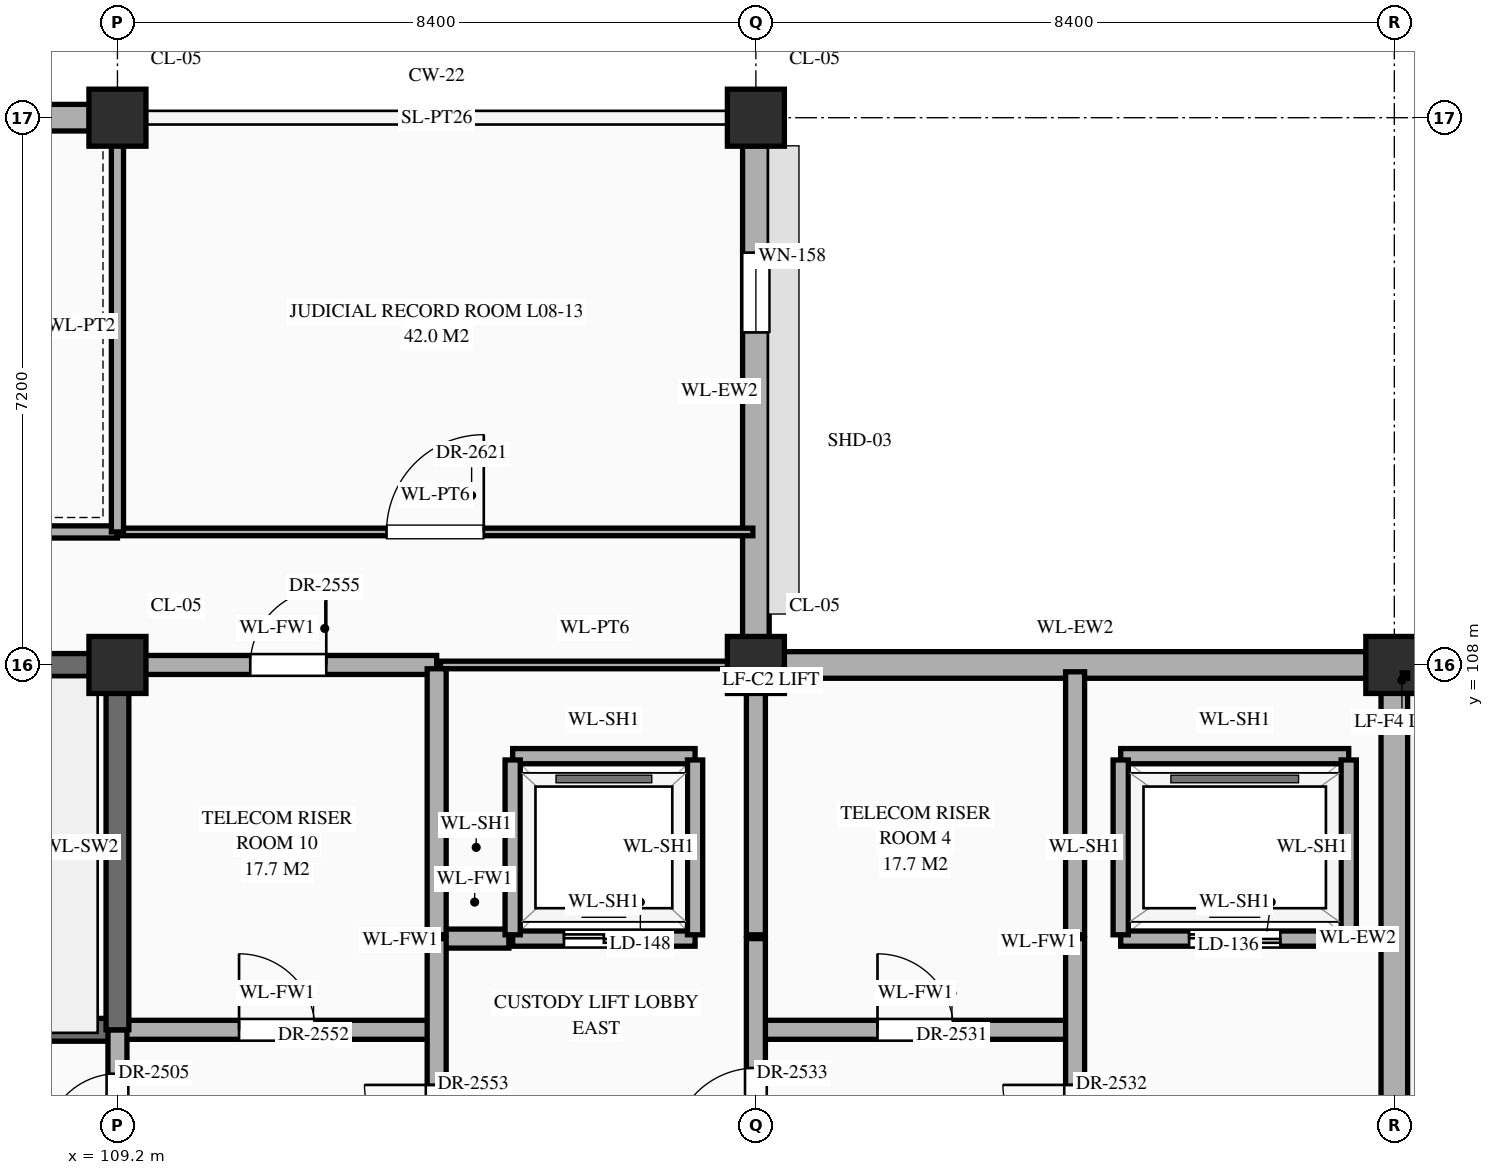
"""IFC4 building model, lengths in metres.
Left out: names, types, materials, properties, quantities, classifications, styles, units other than length and angle.
Written with IfcOpenShell. Run it as: python <this file> out.ifc"""

import sys

from ifc_helpers import new_model, si_unit, direction, frame, frame_2d, origin, origin_2d, place, context, subcontext, project, spatial, rectangle, extrude, element, fill, save


model = new_model("IFC4")
c1 = context("Model", 3, precision=1e-05, world=origin(), true_north=direction((0.0, 1.0)))
c2 = subcontext(c1, "Body", "Model", "MODEL_VIEW")
j1 = project(units=[si_unit("LENGTHUNIT", "METRE"), si_unit("PLANEANGLEUNIT", "RADIAN")], contexts=[c1])
p1 = place(None, origin())
s1 = spatial("IfcSite", under=j1, at=p1, CompositionType="ELEMENT")
p2 = place(p1, origin())
s2 = spatial("IfcBuilding", under=s1, at=p2, CompositionType="ELEMENT")
p3 = place(p2, frame((0.0, 0.0, 35.1)))
s3 = spatial("IfcBuildingStorey", under=s2, at=p3, CompositionType="ELEMENT", Elevation=35.1)
for number, where, z_axis, x_axis in (
    (1, (109.2, 108.0, 0.0), (0.0, 0.0, 1.0), (1.0, 0.0, 0.0)),
    (2, (109.2, 115.2, 0.0), (0.0, 0.0, 1.0), (1.0, 0.0, 0.0)),
    (3, (117.6, 108.0, 0.0), (0.0, 0.0, 1.0), (1.0, 0.0, 0.0)),
    (4, (117.6, 115.2, 0.0), (0.0, 0.0, 1.0), (1.0, 0.0, 0.0)),
    (5, (126.0, 108.0, 0.0), (0.0, 0.0, 1.0), (1.0, 0.0, 0.0)),
):
    element("IfcColumn", number, at=place(p3, frame(where, z_axis=z_axis, x_axis=x_axis)), inside=s3, PredefinedType="COLUMN", context=c2, shape_type="SweptSolid", body=[
        extrude(rectangle(XDim=0.75, YDim=0.75, at=origin_2d()), origin(), (0.0, 0.0, 1.0), 4.2),
    ])
p4 = place(p3, frame((101.17, 115.2, 0.0), z_axis=(0.0, 0.0, 1.0), x_axis=(1.0, 0.0, 0.0)))
e6 = element("IfcWall", 6, at=p4, inside=s3, PredefinedType="STANDARD", context=c2, shape_type="SweptSolid", body=[
    extrude(rectangle(XDim=7.66, YDim=0.35, at=frame_2d((3.83, 0.0))), origin(), (0.0, 0.0, 1.0), 3.3),
])
p5 = place(p3, frame((117.6, 108.37, 0.0), z_axis=(0.0, 0.0, 1.0), x_axis=(0.0, 1.0, 0.0)))
e7 = element("IfcWall", 7, at=p5, inside=s3, PredefinedType="STANDARD", context=c2, shape_type="SweptSolid", body=[
    extrude(rectangle(XDim=6.46, YDim=0.35, at=frame_2d((3.23, 0.0))), origin(), (0.0, 0.0, 1.0), 3.3),
])
p6 = place(p5, frame((4.005, 0.0, 0.85)))
e8 = element("IfcOpeningElement", 8, at=p6, cuts=e7, PredefinedType="OPENING", context=c2, shape_type="SweptSolid", body=[
    extrude(rectangle(XDim=1.05, YDim=1.74, at=frame_2d((0.525, 0.87))), frame((0.0, 0.187, 0.0), z_axis=(0.0, -1.0, 0.0), x_axis=(1.0, 0.0, 0.0)), (0.0, 0.0, 1.0), 0.374),
])
p7 = place(p3, frame((117.97, 108.0, 0.0), z_axis=(0.0, 0.0, 1.0), x_axis=(1.0, 0.0, 0.0)))
e9 = element("IfcWall", 9, at=p7, inside=s3, PredefinedType="STANDARD", context=c2, shape_type="SweptSolid", body=[
    extrude(rectangle(XDim=7.66, YDim=0.35, at=frame_2d((3.83, 0.0))), origin(), (0.0, 0.0, 1.0), 3.3),
])
p8 = place(p3, frame((126.0, 101.17, 0.0), z_axis=(0.0, 0.0, 1.0), x_axis=(0.0, 1.0, 0.0)))
e10 = element("IfcWall", 10, at=p8, inside=s3, PredefinedType="STANDARD", context=c2, shape_type="SweptSolid", body=[
    extrude(rectangle(XDim=6.46, YDim=0.35, at=frame_2d((3.23, 0.0))), origin(), (0.0, 0.0, 1.0), 3.3),
])
p9 = place(p3, frame((100.8, 103.2, 0.0), z_axis=(0.0, 0.0, 1.0), x_axis=(1.0, 0.0, 0.0)))
e11 = element("IfcWall", 11, at=p9, inside=s3, PredefinedType="SHEAR", context=c2, shape_type="SweptSolid", body=[
    extrude(rectangle(XDim=8.4, YDim=0.3, at=frame_2d((4.2, 0.0))), origin(), (0.0, 0.0, 1.0), 3.95),
])
p10 = place(p9, frame((0.65, 0.0, 0.0)))
e12 = element("IfcOpeningElement", 12, at=p10, cuts=e11, PredefinedType="OPENING", context=c2, shape_type="SweptSolid", body=[
    extrude(rectangle(XDim=1.1, YDim=2.2, at=frame_2d((0.55, 1.1))), frame((0.0, 0.162, 0.0), z_axis=(0.0, -1.0, 0.0), x_axis=(1.0, 0.0, 0.0)), (0.0, 0.0, 1.0), 0.324),
])
p11 = place(p3, frame((109.2, 103.2, 0.0), z_axis=(0.0, 0.0, 1.0), x_axis=(1.0, 0.0, 0.0)))
e13 = element("IfcWall", 13, at=p11, inside=s3, PredefinedType="STANDARD", context=c2, shape_type="SweptSolid", body=[
    extrude(rectangle(XDim=4.2, YDim=0.25, at=frame_2d((2.1, 0.0))), origin(), (0.0, 0.0, 1.0), 3.95),
])
p12 = place(p11, frame((1.6, 0.0, 0.0)))
e14 = element("IfcOpeningElement", 14, at=p12, cuts=e13, PredefinedType="OPENING", context=c2, shape_type="SweptSolid", body=[
    extrude(rectangle(XDim=1.0, YDim=2.2, at=frame_2d((0.5, 1.1))), frame((0.0, 0.137, 0.0), z_axis=(0.0, -1.0, 0.0), x_axis=(1.0, 0.0, 0.0)), (0.0, 0.0, 1.0), 0.274),
])
p13 = place(p3, frame((117.6, 103.2, 0.0), z_axis=(0.0, 0.0, 1.0), x_axis=(1.0, 0.0, 0.0)))
e15 = element("IfcWall", 15, at=p13, inside=s3, PredefinedType="STANDARD", context=c2, shape_type="SweptSolid", body=[
    extrude(rectangle(XDim=4.2, YDim=0.25, at=frame_2d((2.1, 0.0))), origin(), (0.0, 0.0, 1.0), 3.95),
])
p14 = place(p13, frame((1.6, 0.0, 0.0)))
e16 = element("IfcOpeningElement", 16, at=p14, cuts=e15, PredefinedType="OPENING", context=c2, shape_type="SweptSolid", body=[
    extrude(rectangle(XDim=1.0, YDim=2.2, at=frame_2d((0.5, 1.1))), frame((0.0, 0.137, 0.0), z_axis=(0.0, -1.0, 0.0), x_axis=(1.0, 0.0, 0.0)), (0.0, 0.0, 1.0), 0.274),
])
p15 = place(p3, frame((113.45, 104.4, 0.0), z_axis=(0.0, 0.0, 1.0), x_axis=(1.0, 0.0, 0.0)))
e17 = element("IfcWall", 17, at=p15, inside=s3, PredefinedType="STANDARD", context=c2, shape_type="SweptSolid", body=[
    extrude(rectangle(XDim=0.9, YDim=0.25, at=frame_2d((0.45, 0.0))), origin(), (0.0, 0.0, 1.0), 3.95),
])
p16 = place(p3, frame((114.4, 104.4, 0.0), z_axis=(0.0, 0.0, 1.0), x_axis=(1.0, 0.0, 0.0)))
e18 = element("IfcWall", 18, at=p16, inside=s3, PredefinedType="STANDARD", context=c2, shape_type="SweptSolid", body=[
    extrude(rectangle(XDim=2.4, YDim=0.2, at=frame_2d((1.2, 0.0))), origin(), (0.0, 0.0, 1.0), 3.95),
])
p17 = place(p16, frame((0.675, 0.0, 0.0)))
e19 = element("IfcOpeningElement", 19, at=p17, cuts=e18, PredefinedType="OPENING", context=c2, shape_type="SweptSolid", body=[
    extrude(rectangle(XDim=1.05, YDim=2.15, at=frame_2d((0.525, 1.075))), frame((0.0, 0.112, 0.0), z_axis=(0.0, -1.0, 0.0), x_axis=(1.0, 0.0, 0.0)), (0.0, 0.0, 1.0), 0.224),
])
p18 = place(p3, frame((122.4, 104.4, 0.0), z_axis=(0.0, 0.0, 1.0), x_axis=(1.0, 0.0, 0.0)))
e20 = element("IfcWall", 20, at=p18, inside=s3, PredefinedType="STANDARD", context=c2, shape_type="SweptSolid", body=[
    extrude(rectangle(XDim=3.0, YDim=0.2, at=frame_2d((1.5, 0.0))), origin(), (0.0, 0.0, 1.0), 3.95),
])
p19 = place(p18, frame((0.9, 0.0, 0.0)))
e21 = element("IfcOpeningElement", 21, at=p19, cuts=e20, PredefinedType="OPENING", context=c2, shape_type="SweptSolid", body=[
    extrude(rectangle(XDim=1.2, YDim=2.15, at=frame_2d((0.6, 1.075))), frame((0.0, 0.112, 0.0), z_axis=(0.0, -1.0, 0.0), x_axis=(1.0, 0.0, 0.0)), (0.0, 0.0, 1.0), 0.224),
])
p20 = place(p3, frame((114.4, 106.8, 0.0), z_axis=(0.0, 0.0, 1.0), x_axis=(1.0, 0.0, 0.0)))
e22 = element("IfcWall", 22, at=p20, inside=s3, PredefinedType="STANDARD", context=c2, shape_type="SweptSolid", body=[
    extrude(rectangle(XDim=2.4, YDim=0.2, at=frame_2d((1.2, 0.0))), origin(), (0.0, 0.0, 1.0), 3.95),
])
p21 = place(p3, frame((122.4, 106.8, 0.0), z_axis=(0.0, 0.0, 1.0), x_axis=(1.0, 0.0, 0.0)))
e23 = element("IfcWall", 23, at=p21, inside=s3, PredefinedType="STANDARD", context=c2, shape_type="SweptSolid", body=[
    extrude(rectangle(XDim=3.0, YDim=0.2, at=frame_2d((1.5, 0.0))), origin(), (0.0, 0.0, 1.0), 3.95),
])
p22 = place(p3, frame((100.8, 108.0, 0.0), z_axis=(0.0, 0.0, 1.0), x_axis=(1.0, 0.0, 0.0)))
e24 = element("IfcWall", 24, at=p22, inside=s3, PredefinedType="SHEAR", context=c2, shape_type="SweptSolid", body=[
    extrude(rectangle(XDim=8.4, YDim=0.3, at=frame_2d((4.2, 0.0))), origin(), (0.0, 0.0, 1.0), 3.95),
])
p23 = place(p3, frame((109.2, 108.0, 0.0), z_axis=(0.0, 0.0, 1.0), x_axis=(1.0, 0.0, 0.0)))
e25 = element("IfcWall", 25, at=p23, inside=s3, PredefinedType="STANDARD", context=c2, shape_type="SweptSolid", body=[
    extrude(rectangle(XDim=4.2, YDim=0.25, at=frame_2d((2.1, 0.0))), origin(), (0.0, 0.0, 1.0), 3.1),
])
p24 = place(p23, frame((1.748, 0.0, 0.0)))
e26 = element("IfcOpeningElement", 26, at=p24, cuts=e25, PredefinedType="OPENING", context=c2, shape_type="SweptSolid", body=[
    extrude(rectangle(XDim=1.0, YDim=2.2, at=frame_2d((0.5, 1.1))), frame((0.0, 0.137, 0.0), z_axis=(0.0, -1.0, 0.0), x_axis=(1.0, 0.0, 0.0)), (0.0, 0.0, 1.0), 0.274),
])
p25 = place(p3, frame((113.45, 108.0, 0.0), z_axis=(0.0, 0.0, 1.0), x_axis=(1.0, 0.0, 0.0)))
e27 = element("IfcWall", 27, at=p25, inside=s3, PredefinedType="STANDARD", context=c2, shape_type="SweptSolid", body=[
    extrude(rectangle(XDim=4.06, YDim=0.1, at=frame_2d((2.03, 0.0))), origin(), (0.0, 0.0, 1.0), 3.1),
])
p26 = place(p3, frame((92.4, 109.75, 0.0), z_axis=(0.0, 0.0, 1.0), x_axis=(1.0, 0.0, 0.0)))
e28 = element("IfcWall", 28, at=p26, inside=s3, PredefinedType="STANDARD", context=c2, shape_type="SweptSolid", body=[
    extrude(rectangle(XDim=16.8, YDim=0.16, at=frame_2d((8.4, 0.0))), origin(), (0.0, 0.0, 1.0), 3.95),
])
p27 = place(p26, frame((7.5, 0.0, 0.0)))
e29 = element("IfcOpeningElement", 29, at=p27, cuts=e28, PredefinedType="OPENING", context=c2, shape_type="SweptSolid", body=[
    extrude(rectangle(XDim=1.8, YDim=2.5, at=frame_2d((0.9, 1.25))), frame((0.0, 0.092, 0.0), z_axis=(0.0, -1.0, 0.0), x_axis=(1.0, 0.0, 0.0)), (0.0, 0.0, 1.0), 0.184),
])
p28 = place(p3, frame((109.2, 109.75, 0.0), z_axis=(0.0, 0.0, 1.0), x_axis=(1.0, 0.0, 0.0)))
e30 = element("IfcWall", 30, at=p28, inside=s3, PredefinedType="STANDARD", context=c2, shape_type="SweptSolid", body=[
    extrude(rectangle(XDim=8.36, YDim=0.1, at=frame_2d((4.18, 0.0))), origin(), (0.0, 0.0, 1.0), 3.95),
])
p29 = place(p28, frame((3.54, 0.0, 0.0)))
e31 = element("IfcOpeningElement", 31, at=p29, cuts=e30, PredefinedType="OPENING", context=c2, shape_type="SweptSolid", body=[
    extrude(rectangle(XDim=1.28, YDim=2.35, at=frame_2d((0.64, 1.175))), frame((0.0, 0.062, 0.0), z_axis=(0.0, -1.0, 0.0), x_axis=(1.0, 0.0, 0.0)), (0.0, 0.0, 1.0), 0.124),
])
p30 = place(p3, frame((109.2, 100.8, 0.0), z_axis=(0.0, 0.0, 1.0), x_axis=(0.0, 1.0, 0.0)))
e32 = element("IfcWall", 32, at=p30, inside=s3, PredefinedType="STANDARD", context=c2, shape_type="SweptSolid", body=[
    extrude(rectangle(XDim=2.4, YDim=0.25, at=frame_2d((1.2, 0.0))), origin(), (0.0, 0.0, 1.0), 3.2),
])
p31 = place(p30, frame((0.873, 0.0, 0.0)))
e33 = element("IfcOpeningElement", 33, at=p31, cuts=e32, PredefinedType="OPENING", context=c2, shape_type="SweptSolid", body=[
    extrude(rectangle(XDim=0.95, YDim=2.15, at=frame_2d((0.475, 1.075))), frame((0.0, 0.137, 0.0), z_axis=(0.0, -1.0, 0.0), x_axis=(1.0, 0.0, 0.0)), (0.0, 0.0, 1.0), 0.274),
])
p32 = place(p3, frame((109.2, 103.2, 0.0), z_axis=(0.0, 0.0, 1.0), x_axis=(0.0, 1.0, 0.0)))
e34 = element("IfcWall", 34, at=p32, inside=s3, PredefinedType="SHEAR", context=c2, shape_type="SweptSolid", body=[
    extrude(rectangle(XDim=4.8, YDim=0.3, at=frame_2d((2.4, 0.0))), origin(), (0.0, 0.0, 1.0), 3.95),
])
p33 = place(p3, frame((109.2, 109.75, 0.0), z_axis=(0.0, 0.0, 1.0), x_axis=(0.0, 1.0, 0.0)))
e35 = element("IfcWall", 35, at=p33, inside=s3, PredefinedType="STANDARD", context=c2, shape_type="SweptSolid", body=[
    extrude(rectangle(XDim=5.41, YDim=0.16, at=frame_2d((2.705, 0.0))), origin(), (0.0, 0.0, 1.0), 3.2),
])
p34 = place(p3, frame((113.4, 100.8, 0.0), z_axis=(0.0, 0.0, 1.0), x_axis=(0.0, 1.0, 0.0)))
e36 = element("IfcWall", 36, at=p34, inside=s3, PredefinedType="STANDARD", context=c2, shape_type="SweptSolid", body=[
    extrude(rectangle(XDim=3.6, YDim=0.25, at=frame_2d((1.8, 0.0))), origin(), (0.0, 0.0, 1.0), 3.95),
])
p35 = place(p34, frame((0.725, 0.0, 0.0)))
e37 = element("IfcOpeningElement", 37, at=p35, cuts=e36, PredefinedType="OPENING", context=c2, shape_type="SweptSolid", body=[
    extrude(rectangle(XDim=0.95, YDim=2.15, at=frame_2d((0.475, 1.075))), frame((0.0, 0.137, 0.0), z_axis=(0.0, -1.0, 0.0), x_axis=(1.0, 0.0, 0.0)), (0.0, 0.0, 1.0), 0.274),
])
p36 = place(p3, frame((113.4, 104.45, 0.0), z_axis=(0.0, 0.0, 1.0), x_axis=(0.0, 1.0, 0.0)))
e38 = element("IfcWall", 38, at=p36, inside=s3, PredefinedType="STANDARD", context=c2, shape_type="SweptSolid", body=[
    extrude(rectangle(XDim=3.5, YDim=0.25, at=frame_2d((1.75, 0.0))), origin(), (0.0, 0.0, 1.0), 3.95),
])
for number, where, z_axis, x_axis in (
    (39, (114.4, 104.45, 0.0), (0.0, 0.0, 1.0), (0.0, 1.0, 0.0)),
    (40, (116.8, 104.45, 0.0), (0.0, 0.0, 1.0), (0.0, 1.0, 0.0)),
):
    element("IfcWall", number, at=place(p3, frame(where, z_axis=z_axis, x_axis=x_axis)), inside=s3, PredefinedType="STANDARD", context=c2, shape_type="SweptSolid", body=[
        extrude(rectangle(XDim=2.3, YDim=0.2, at=frame_2d((1.15, 0.0))), origin(), (0.0, 0.0, 1.0), 3.95),
    ])
p37 = place(p3, frame((117.6, 91.2, 0.0), z_axis=(0.0, 0.0, 1.0), x_axis=(0.0, 1.0, 0.0)))
e41 = element("IfcWall", 41, at=p37, inside=s3, PredefinedType="STANDARD", context=c2, shape_type="SweptSolid", body=[
    extrude(rectangle(XDim=13.2, YDim=0.25, at=frame_2d((6.6, 0.0))), origin(), (0.0, 0.0, 1.0), 3.2),
])
p38 = place(p37, frame((0.552, 0.0, 0.0)))
e42 = element("IfcOpeningElement", 42, at=p38, cuts=e41, PredefinedType="OPENING", context=c2, shape_type="SweptSolid", body=[
    extrude(rectangle(XDim=1.0, YDim=2.2, at=frame_2d((0.5, 1.1))), frame((0.0, 0.137, 0.0), z_axis=(0.0, -1.0, 0.0), x_axis=(1.0, 0.0, 0.0)), (0.0, 0.0, 1.0), 0.274),
])
p39 = place(p37, frame((10.397, 0.0, 0.0)))
e43 = element("IfcOpeningElement", 43, at=p39, cuts=e41, PredefinedType="OPENING", context=c2, shape_type="SweptSolid", body=[
    extrude(rectangle(XDim=1.1, YDim=2.2, at=frame_2d((0.55, 1.1))), frame((0.0, 0.137, 0.0), z_axis=(0.0, -1.0, 0.0), x_axis=(1.0, 0.0, 0.0)), (0.0, 0.0, 1.0), 0.274),
])
p40 = place(p37, frame((3.198, 0.0, 0.0)))
e44 = element("IfcOpeningElement", 44, at=p40, cuts=e41, PredefinedType="OPENING", context=c2, shape_type="SweptSolid", body=[
    extrude(rectangle(XDim=1.1, YDim=2.2, at=frame_2d((0.55, 1.1))), frame((0.0, 0.137, 0.0), z_axis=(0.0, -1.0, 0.0), x_axis=(1.0, 0.0, 0.0)), (0.0, 0.0, 1.0), 0.274),
])
p41 = place(p3, frame((117.6, 104.45, 0.0), z_axis=(0.0, 0.0, 1.0), x_axis=(0.0, 1.0, 0.0)))
e45 = element("IfcWall", 45, at=p41, inside=s3, PredefinedType="STANDARD", context=c2, shape_type="SweptSolid", body=[
    extrude(rectangle(XDim=3.46, YDim=0.25, at=frame_2d((1.73, 0.0))), origin(), (0.0, 0.0, 1.0), 3.2),
])
p42 = place(p3, frame((121.8, 100.8, 0.0), z_axis=(0.0, 0.0, 1.0), x_axis=(0.0, 1.0, 0.0)))
e46 = element("IfcWall", 46, at=p42, inside=s3, PredefinedType="STANDARD", context=c2, shape_type="SweptSolid", body=[
    extrude(rectangle(XDim=3.6, YDim=0.25, at=frame_2d((1.8, 0.0))), origin(), (0.0, 0.0, 1.0), 3.6),
])
p43 = place(p42, frame((0.725, 0.0, 0.0)))
e47 = element("IfcOpeningElement", 47, at=p43, cuts=e46, PredefinedType="OPENING", context=c2, shape_type="SweptSolid", body=[
    extrude(rectangle(XDim=0.95, YDim=2.15, at=frame_2d((0.475, 1.075))), frame((0.0, 0.137, 0.0), z_axis=(0.0, -1.0, 0.0), x_axis=(1.0, 0.0, 0.0)), (0.0, 0.0, 1.0), 0.274),
])
p44 = place(p3, frame((121.8, 104.45, 0.0), z_axis=(0.0, 0.0, 1.0), x_axis=(0.0, 1.0, 0.0)))
e48 = element("IfcWall", 48, at=p44, inside=s3, PredefinedType="STANDARD", context=c2, shape_type="SweptSolid", body=[
    extrude(rectangle(XDim=3.46, YDim=0.25, at=frame_2d((1.73, 0.0))), origin(), (0.0, 0.0, 1.0), 3.6),
])
for number, where, z_axis, x_axis in (
    (49, (122.4, 104.45, 0.0), (0.0, 0.0, 1.0), (0.0, 1.0, 0.0)),
    (50, (125.4, 104.45, 0.0), (0.0, 0.0, 1.0), (0.0, 1.0, 0.0)),
):
    element("IfcWall", number, at=place(p3, frame(where, z_axis=z_axis, x_axis=x_axis)), inside=s3, PredefinedType="STANDARD", context=c2, shape_type="SweptSolid", body=[
        extrude(rectangle(XDim=2.3, YDim=0.2, at=frame_2d((1.15, 0.0))), origin(), (0.0, 0.0, 1.0), 3.95),
    ])
p45 = place(p6, origin())
e51 = element("IfcWindow", 51, at=p45, inside=s3, PartitioningType="SINGLE_PANEL", PredefinedType="WINDOW", context=c2, shape_type="SweptSolid", body=[
    extrude(rectangle(XDim=1.05, YDim=1.74, at=frame_2d((0.525, 0.87))), frame((0.0, 0.03, 0.0), z_axis=(0.0, -1.0, 0.0), x_axis=(1.0, 0.0, 0.0)), (0.0, 0.0, 1.0), 0.06),
])
fill(e8, e51)
p46 = place(p19, origin())
e52 = element("IfcDoor", 52, at=p46, inside=s3, OperationType="DOUBLE_DOOR_SLIDING", PredefinedType="DOOR", context=c2, shape_type="SweptSolid", body=[
    extrude(rectangle(XDim=1.2, YDim=2.15, at=frame_2d((0.6, 1.075))), frame((0.0, 0.025, 0.0), z_axis=(0.0, -1.0, 0.0), x_axis=(1.0, 0.0, 0.0)), (0.0, 0.0, 1.0), 0.05),
])
fill(e21, e52)
p47 = place(p17, origin())
e53 = element("IfcDoor", 53, at=p47, inside=s3, OperationType="DOUBLE_DOOR_SLIDING", PredefinedType="DOOR", context=c2, shape_type="SweptSolid", body=[
    extrude(rectangle(XDim=1.05, YDim=2.15, at=frame_2d((0.525, 1.075))), frame((0.0, 0.025, 0.0), z_axis=(0.0, -1.0, 0.0), x_axis=(1.0, 0.0, 0.0)), (0.0, 0.0, 1.0), 0.05),
])
fill(e19, e53)
p48 = place(p31, origin())
e54 = element("IfcDoor", 54, at=p48, inside=s3, OperationType="SINGLE_SWING_LEFT", PredefinedType="DOOR", context=c2, shape_type="SweptSolid", body=[
    extrude(rectangle(XDim=0.95, YDim=2.15, at=frame_2d((0.475, 1.075))), frame((0.0, 0.025, 0.0), z_axis=(0.0, -1.0, 0.0), x_axis=(1.0, 0.0, 0.0)), (0.0, 0.0, 1.0), 0.05),
])
fill(e33, e54)
p49 = place(p14, origin())
e55 = element("IfcDoor", 55, at=p49, inside=s3, OperationType="SINGLE_SWING_LEFT", PredefinedType="DOOR", context=c2, shape_type="SweptSolid", body=[
    extrude(rectangle(XDim=1.0, YDim=2.2, at=frame_2d((0.5, 1.1))), frame((0.0, 0.025, 0.0), z_axis=(0.0, -1.0, 0.0), x_axis=(1.0, 0.0, 0.0)), (0.0, 0.0, 1.0), 0.05),
])
fill(e16, e55)
p50 = place(p43, origin())
e56 = element("IfcDoor", 56, at=p50, inside=s3, OperationType="SINGLE_SWING_RIGHT", PredefinedType="DOOR", context=c2, shape_type="SweptSolid", body=[
    extrude(rectangle(XDim=0.95, YDim=2.15, at=frame_2d((0.475, 1.075))), frame((0.0, 0.025, 0.0), z_axis=(0.0, -1.0, 0.0), x_axis=(1.0, 0.0, 0.0)), (0.0, 0.0, 1.0), 0.05),
])
fill(e47, e56)
p51 = place(p39, origin())
e57 = element("IfcDoor", 57, at=p51, inside=s3, OperationType="SINGLE_SWING_LEFT", PredefinedType="DOOR", context=c2, shape_type="SweptSolid", body=[
    extrude(rectangle(XDim=1.1, YDim=2.2, at=frame_2d((0.55, 1.1))), frame((0.0, 0.025, 0.0), z_axis=(0.0, -1.0, 0.0), x_axis=(1.0, 0.0, 0.0)), (0.0, 0.0, 1.0), 0.05),
])
fill(e43, e57)
p52 = place(p12, origin())
e58 = element("IfcDoor", 58, at=p52, inside=s3, OperationType="SINGLE_SWING_LEFT", PredefinedType="DOOR", context=c2, shape_type="SweptSolid", body=[
    extrude(rectangle(XDim=1.0, YDim=2.2, at=frame_2d((0.5, 1.1))), frame((0.0, 0.025, 0.0), z_axis=(0.0, -1.0, 0.0), x_axis=(1.0, 0.0, 0.0)), (0.0, 0.0, 1.0), 0.05),
])
fill(e14, e58)
p53 = place(p35, origin())
e59 = element("IfcDoor", 59, at=p53, inside=s3, OperationType="SINGLE_SWING_RIGHT", PredefinedType="DOOR", context=c2, shape_type="SweptSolid", body=[
    extrude(rectangle(XDim=0.95, YDim=2.15, at=frame_2d((0.475, 1.075))), frame((0.0, 0.025, 0.0), z_axis=(0.0, -1.0, 0.0), x_axis=(1.0, 0.0, 0.0)), (0.0, 0.0, 1.0), 0.05),
])
fill(e37, e59)
p54 = place(p24, origin())
e60 = element("IfcDoor", 60, at=p54, inside=s3, OperationType="SINGLE_SWING_RIGHT", PredefinedType="DOOR", context=c2, shape_type="SweptSolid", body=[
    extrude(rectangle(XDim=1.0, YDim=2.2, at=frame_2d((0.5, 1.1))), frame((0.0, 0.025, 0.0), z_axis=(0.0, -1.0, 0.0), x_axis=(1.0, 0.0, 0.0)), (0.0, 0.0, 1.0), 0.05),
])
fill(e26, e60)
p55 = place(p29, origin())
e61 = element("IfcDoor", 61, at=p55, inside=s3, OperationType="SINGLE_SWING_RIGHT", PredefinedType="DOOR", context=c2, shape_type="SweptSolid", body=[
    extrude(rectangle(XDim=1.28, YDim=2.35, at=frame_2d((0.64, 1.175))), frame((0.0, 0.025, 0.0), z_axis=(0.0, -1.0, 0.0), x_axis=(1.0, 0.0, 0.0)), (0.0, 0.0, 1.0), 0.05),
])
fill(e31, e61)
save(model, sys.argv[1])
